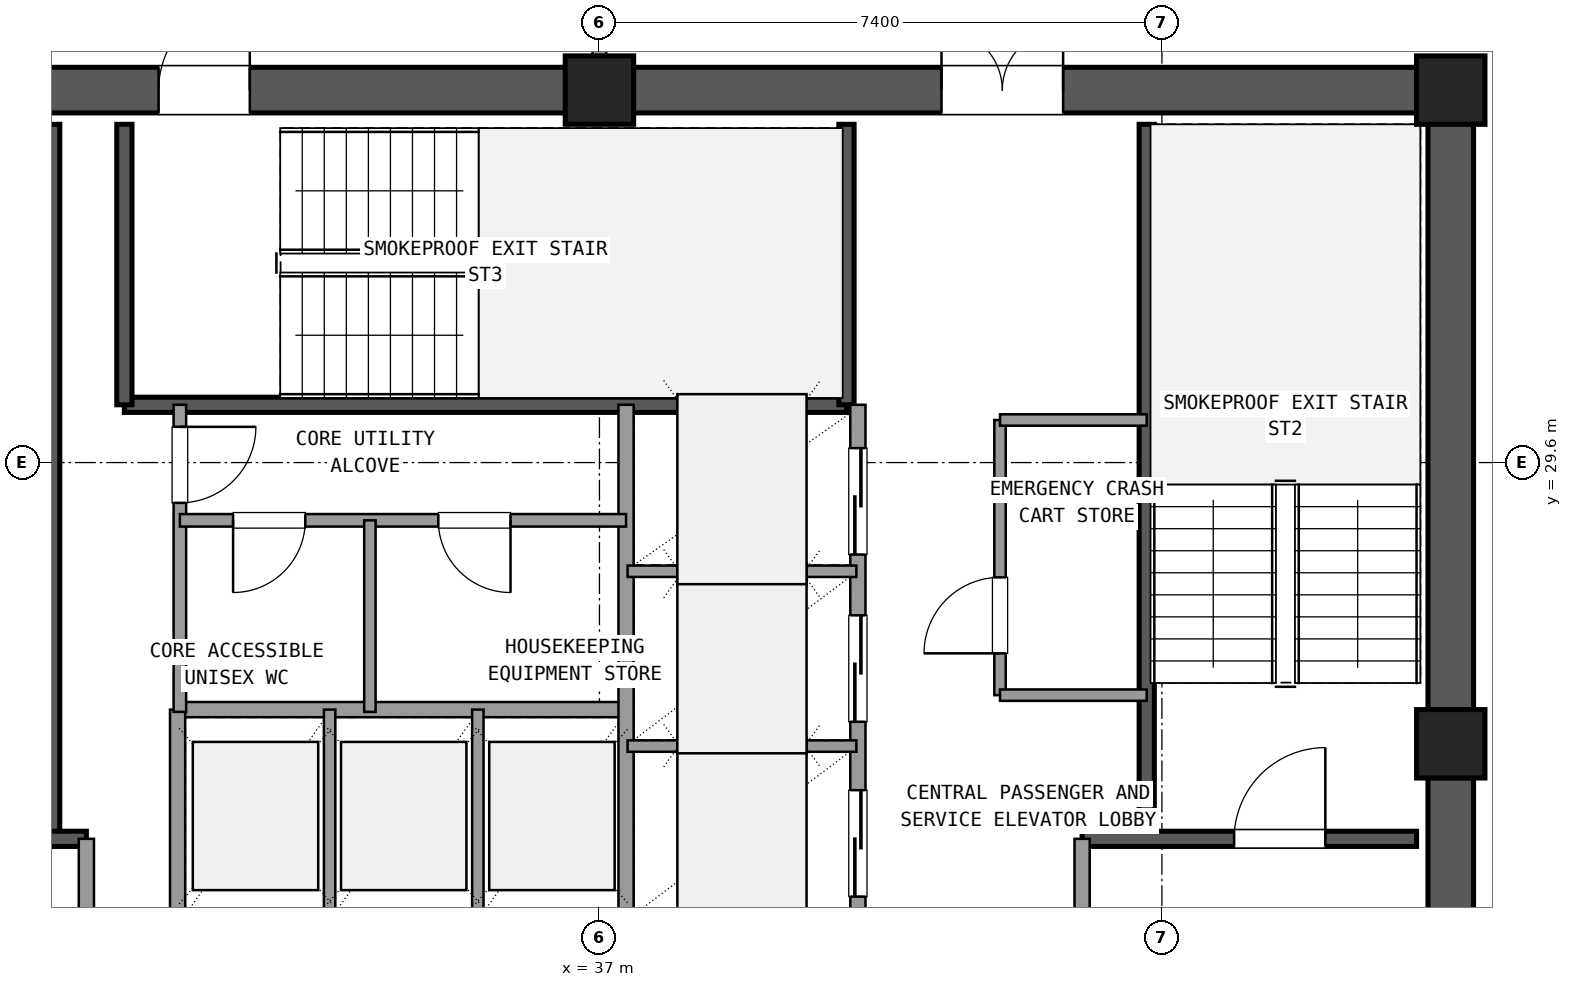
"""IFC4 building model, lengths in metres.
Left out: names, types, materials, properties, quantities, classifications, styles, units other than length and angle.
Written with IfcOpenShell. Run it as: python <this file> out.ifc"""

import sys

from ifc_helpers import new_model, si_unit, direction, frame, frame_2d, origin, origin_2d, place, context, subcontext, project, spatial, rectangle, extrude, element, fill, save


model = new_model("IFC4")
c1 = context("Model", 3, precision=1e-05, world=origin(), true_north=direction((0.0, 1.0)))
c2 = subcontext(c1, "Body", "Model", "MODEL_VIEW")
j1 = project(units=[si_unit("LENGTHUNIT", "METRE"), si_unit("PLANEANGLEUNIT", "RADIAN")], contexts=[c1])
p1 = place(None, origin())
s1 = spatial("IfcSite", under=j1, at=p1, CompositionType="ELEMENT")
p2 = place(p1, origin())
s2 = spatial("IfcBuilding", under=s1, at=p2, CompositionType="ELEMENT")
p3 = place(p2, frame((0.0, 0.0, 192.78)))
s3 = spatial("IfcBuildingStorey", under=s2, at=p3, CompositionType="ELEMENT", Elevation=192.78)
for number, where, z_axis, x_axis in (
    (1, (48.2, 25.9, 0.0), (0.0, 0.0, 1.0), (1.0, 0.0, 0.0)),
    (2, (48.2, 34.5, 0.0), (0.0, 0.0, 1.0), (1.0, 0.0, 0.0)),
    (3, (37.0, 34.5, 0.0), (0.0, 0.0, 1.0), (1.0, 0.0, 0.0)),
):
    element("IfcColumn", number, at=place(p3, frame(where, z_axis=z_axis, x_axis=x_axis)), inside=s3, PredefinedType="COLUMN", context=c2, shape_type="SweptSolid", body=[
        extrude(rectangle(XDim=0.9, YDim=0.9, at=origin_2d()), origin(), (0.0, 0.0, 1.0), 3.6),
    ])
p4 = place(p3, frame((48.2, 17.745, 0.0), z_axis=(0.0, 0.0, 1.0), x_axis=(0.0, 1.0, 0.0)))
e4 = element("IfcWall", 4, at=p4, inside=s3, PredefinedType="SHEAR", context=c2, shape_type="SweptSolid", body=[
    extrude(rectangle(XDim=7.71, YDim=0.6, at=frame_2d((3.855, 0.0))), origin(), (0.0, 0.0, 1.0), 3.32),
])
p5 = place(p4, frame((4.305, 0.0, 0.0)))
e5 = element("IfcOpeningElement", 5, at=p5, cuts=e4, PredefinedType="OPENING", context=c2, shape_type="SweptSolid", body=[
    extrude(rectangle(XDim=1.2, YDim=2.15, at=frame_2d((0.6, 1.075))), frame((0.0, 0.31, 0.0), z_axis=(0.0, -1.0, 0.0), x_axis=(1.0, 0.0, 0.0)), (0.0, 0.0, 1.0), 0.62),
])
p6 = place(p3, frame((48.2, 26.345, 0.0), z_axis=(0.0, 0.0, 1.0), x_axis=(0.0, 1.0, 0.0)))
e6 = element("IfcWall", 6, at=p6, inside=s3, PredefinedType="SHEAR", context=c2, shape_type="SweptSolid", body=[
    extrude(rectangle(XDim=7.71, YDim=0.6, at=frame_2d((3.855, 0.0))), origin(), (0.0, 0.0, 1.0), 3.32),
])
p7 = place(p3, frame((47.755, 34.5, 0.0), z_axis=(0.0, 0.0, 1.0), x_axis=(-1.0, 0.0, 0.0)))
e7 = element("IfcWall", 7, at=p7, inside=s3, PredefinedType="SHEAR", context=c2, shape_type="SweptSolid", body=[
    extrude(rectangle(XDim=10.31, YDim=0.6, at=frame_2d((5.155, 0.0))), origin(), (0.0, 0.0, 1.0), 3.32),
])
p8 = place(p7, frame((4.655, 0.0, 0.0)))
e8 = element("IfcOpeningElement", 8, at=p8, cuts=e7, PredefinedType="OPENING", context=c2, shape_type="SweptSolid", body=[
    extrude(rectangle(XDim=1.6, YDim=2.2, at=frame_2d((0.8, 1.1))), frame((0.0, 0.31, 0.0), z_axis=(0.0, -1.0, 0.0), x_axis=(1.0, 0.0, 0.0)), (0.0, 0.0, 1.0), 0.62),
])
p9 = place(p3, frame((36.555, 34.5, 0.0), z_axis=(0.0, 0.0, 1.0), x_axis=(-1.0, 0.0, 0.0)))
e9 = element("IfcWall", 9, at=p9, inside=s3, PredefinedType="SHEAR", context=c2, shape_type="SweptSolid", body=[
    extrude(rectangle(XDim=10.31, YDim=0.6, at=frame_2d((5.155, 0.0))), origin(), (0.0, 0.0, 1.0), 3.32),
])
p10 = place(p9, frame((4.155, 0.0, 0.0)))
e10 = element("IfcOpeningElement", 10, at=p10, cuts=e9, PredefinedType="OPENING", context=c2, shape_type="SweptSolid", body=[
    extrude(rectangle(XDim=1.2, YDim=2.15, at=frame_2d((0.6, 1.075))), frame((0.0, 0.31, 0.0), z_axis=(0.0, -1.0, 0.0), x_axis=(1.0, 0.0, 0.0)), (0.0, 0.0, 1.0), 0.62),
])
p11 = place(p3, frame((29.8, 24.65, 0.0), z_axis=(0.0, 0.0, 1.0), x_axis=(0.0, 1.0, 0.0)))
e11 = element("IfcWall", 11, at=p11, inside=s3, PredefinedType="SHEAR", context=c2, shape_type="SweptSolid", body=[
    extrude(rectangle(XDim=9.4, YDim=0.2, at=frame_2d((4.7, 0.0))), origin(), (0.0, 0.0, 1.0), 3.32),
])
p12 = place(p3, frame((26.25, 24.65, 0.0), z_axis=(0.0, 0.0, 1.0), x_axis=(1.0, 0.0, 0.0)))
e12 = element("IfcWall", 12, at=p12, inside=s3, PredefinedType="SHEAR", context=c2, shape_type="SweptSolid", body=[
    extrude(rectangle(XDim=4.0, YDim=0.2, at=frame_2d((2.0, 0.0))), origin(), (0.0, 0.0, 1.0), 3.32),
])
p13 = place(p12, frame((1.0, 0.0, 0.0)))
e13 = element("IfcOpeningElement", 13, at=p13, cuts=e12, PredefinedType="OPENING", context=c2, shape_type="SweptSolid", body=[
    extrude(rectangle(XDim=1.2, YDim=2.15, at=frame_2d((0.6, 1.075))), frame((0.0, 0.11, 0.0), z_axis=(0.0, -1.0, 0.0), x_axis=(1.0, 0.0, 0.0)), (0.0, 0.0, 1.0), 0.22),
])
p14 = place(p3, frame((44.2, 24.65, 0.0), z_axis=(0.0, 0.0, 1.0), x_axis=(0.0, 1.0, 0.0)))
e14 = element("IfcWall", 14, at=p14, inside=s3, PredefinedType="SHEAR", context=c2, shape_type="SweptSolid", body=[
    extrude(rectangle(XDim=9.4, YDim=0.2, at=frame_2d((4.7, 0.0))), origin(), (0.0, 0.0, 1.0), 3.32),
])
p15 = place(p3, frame((43.35, 24.65, 0.0), z_axis=(0.0, 0.0, 1.0), x_axis=(1.0, 0.0, 0.0)))
e15 = element("IfcWall", 15, at=p15, inside=s3, PredefinedType="SHEAR", context=c2, shape_type="SweptSolid", body=[
    extrude(rectangle(XDim=4.4, YDim=0.2, at=frame_2d((2.2, 0.0))), origin(), (0.0, 0.0, 1.0), 3.32),
])
p16 = place(p15, frame((2.0, 0.0, 0.0)))
e16 = element("IfcOpeningElement", 16, at=p16, cuts=e15, PredefinedType="OPENING", context=c2, shape_type="SweptSolid", body=[
    extrude(rectangle(XDim=1.2, YDim=2.15, at=frame_2d((0.6, 1.075))), frame((0.0, 0.11, 0.0), z_axis=(0.0, -1.0, 0.0), x_axis=(1.0, 0.0, 0.0)), (0.0, 0.0, 1.0), 0.22),
])
p17 = place(p3, frame((30.75, 30.36, 0.0), z_axis=(0.0, 0.0, 1.0), x_axis=(1.0, 0.0, 0.0)))
e17 = element("IfcWall", 17, at=p17, inside=s3, PredefinedType="SHEAR", context=c2, shape_type="SweptSolid", body=[
    extrude(rectangle(XDim=9.5, YDim=0.2, at=frame_2d((4.75, 0.0))), origin(), (0.0, 0.0, 1.0), 3.32),
])
for number, where, z_axis, x_axis in (
    (18, (30.75, 30.36, 0.0), (0.0, 0.0, 1.0), (0.0, 1.0, 0.0)),
    (19, (40.25, 30.36, 0.0), (0.0, 0.0, 1.0), (0.0, 1.0, 0.0)),
):
    element("IfcWall", number, at=place(p3, frame(where, z_axis=z_axis, x_axis=x_axis)), inside=s3, PredefinedType="SHEAR", context=c2, shape_type="SweptSolid", body=[
        extrude(rectangle(XDim=3.69, YDim=0.2, at=frame_2d((1.845, 0.0))), origin(), (0.0, 0.0, 1.0), 3.32),
    ])
p18 = place(p3, frame((30.25, 17.75, 0.0), z_axis=(0.0, 0.0, 1.0), x_axis=(0.0, 1.0, 0.0)))
e20 = element("IfcWall", 20, at=p18, inside=s3, PredefinedType="SOLIDWALL", context=c2, shape_type="SweptSolid", body=[
    extrude(rectangle(XDim=6.9, YDim=0.2, at=frame_2d((3.45, 0.0))), origin(), (0.0, 0.0, 1.0), 2.61),
])
p19 = place(p18, frame((4.15, 0.0, 0.0)))
e21 = element("IfcOpeningElement", 21, at=p19, cuts=e20, PredefinedType="OPENING", context=c2, shape_type="SweptSolid", body=[
    extrude(rectangle(XDim=1.2, YDim=2.15, at=frame_2d((0.6, 1.075))), frame((0.0, 0.11, 0.0), z_axis=(0.0, -1.0, 0.0), x_axis=(1.0, 0.0, 0.0)), (0.0, 0.0, 1.0), 0.22),
])
p20 = place(p3, frame((43.35, 17.75, 0.0), z_axis=(0.0, 0.0, 1.0), x_axis=(0.0, 1.0, 0.0)))
e22 = element("IfcWall", 22, at=p20, inside=s3, PredefinedType="SOLIDWALL", context=c2, shape_type="SweptSolid", body=[
    extrude(rectangle(XDim=6.9, YDim=0.2, at=frame_2d((3.45, 0.0))), origin(), (0.0, 0.0, 1.0), 2.61),
])
p21 = place(p20, frame((4.15, 0.0, 0.0)))
e23 = element("IfcOpeningElement", 23, at=p21, cuts=e22, PredefinedType="OPENING", context=c2, shape_type="SweptSolid", body=[
    extrude(rectangle(XDim=1.2, YDim=2.15, at=frame_2d((0.6, 1.075))), frame((0.0, 0.11, 0.0), z_axis=(0.0, -1.0, 0.0), x_axis=(1.0, 0.0, 0.0)), (0.0, 0.0, 1.0), 0.22),
])
p22 = place(p3, frame((31.45, 26.35, 0.0), z_axis=(0.0, 0.0, 1.0), x_axis=(1.0, 0.0, 0.0)))
e24 = element("IfcWall", 24, at=p22, inside=s3, PredefinedType="SOLIDWALL", context=c2, shape_type="SweptSolid", body=[
    extrude(rectangle(XDim=5.9, YDim=0.2, at=frame_2d((2.95, 0.0))), origin(), (0.0, 0.0, 1.0), 2.61),
])
p23 = place(p3, frame((31.45, 23.54, 0.0), z_axis=(0.0, 0.0, 1.0), x_axis=(0.0, 1.0, 0.0)))
e25 = element("IfcWall", 25, at=p23, inside=s3, PredefinedType="SOLIDWALL", context=c2, shape_type="SweptSolid", body=[
    extrude(rectangle(XDim=2.81, YDim=0.2, at=frame_2d((1.405, 0.0))), origin(), (0.0, 0.0, 1.0), 2.61),
])
for number, where, z_axis, x_axis in (
    (26, (33.45, 23.54, 0.0), (0.0, 0.0, 1.0), (0.0, 1.0, 0.0)),
    (27, (35.4, 23.54, 0.0), (0.0, 0.0, 1.0), (0.0, 1.0, 0.0)),
):
    element("IfcWall", number, at=place(p3, frame(where, z_axis=z_axis, x_axis=x_axis)), inside=s3, PredefinedType="PARTITIONING", context=c2, shape_type="SweptSolid", body=[
        extrude(rectangle(XDim=2.81, YDim=0.15, at=frame_2d((1.405, 0.0))), origin(), (0.0, 0.0, 1.0), 2.61),
    ])
p24 = place(p3, frame((37.35, 23.54, 0.0), z_axis=(0.0, 0.0, 1.0), x_axis=(0.0, 1.0, 0.0)))
e28 = element("IfcWall", 28, at=p24, inside=s3, PredefinedType="SOLIDWALL", context=c2, shape_type="SweptSolid", body=[
    extrude(rectangle(XDim=6.82, YDim=0.2, at=frame_2d((3.41, 0.0))), origin(), (0.0, 0.0, 1.0), 2.61),
])
p25 = place(p3, frame((40.4, 23.54, 0.0), z_axis=(0.0, 0.0, 1.0), x_axis=(0.0, 1.0, 0.0)))
e29 = element("IfcWall", 29, at=p25, inside=s3, PredefinedType="SOLIDWALL", context=c2, shape_type="SweptSolid", body=[
    extrude(rectangle(XDim=6.82, YDim=0.2, at=frame_2d((3.41, 0.0))), origin(), (0.0, 0.0, 1.0), 2.61),
])
p26 = place(p25, frame((0.35, 0.0, 0.0)))
e30 = element("IfcOpeningElement", 30, at=p26, cuts=e29, PredefinedType="OPENING", context=c2, shape_type="SweptSolid", body=[
    extrude(rectangle(XDim=1.4, YDim=2.2, at=frame_2d((0.7, 1.1))), frame((0.0, 0.11, 0.0), z_axis=(0.0, -1.0, 0.0), x_axis=(1.0, 0.0, 0.0)), (0.0, 0.0, 1.0), 0.22),
])
p27 = place(p25, frame((2.65, 0.0, 0.0)))
e31 = element("IfcOpeningElement", 31, at=p27, cuts=e29, PredefinedType="OPENING", context=c2, shape_type="SweptSolid", body=[
    extrude(rectangle(XDim=1.4, YDim=2.2, at=frame_2d((0.7, 1.1))), frame((0.0, 0.11, 0.0), z_axis=(0.0, -1.0, 0.0), x_axis=(1.0, 0.0, 0.0)), (0.0, 0.0, 1.0), 0.22),
])
p28 = place(p25, frame((4.85, 0.0, 0.0)))
e32 = element("IfcOpeningElement", 32, at=p28, cuts=e29, PredefinedType="OPENING", context=c2, shape_type="SweptSolid", body=[
    extrude(rectangle(XDim=1.4, YDim=2.2, at=frame_2d((0.7, 1.1))), frame((0.0, 0.11, 0.0), z_axis=(0.0, -1.0, 0.0), x_axis=(1.0, 0.0, 0.0)), (0.0, 0.0, 1.0), 0.22),
])
for number, where, z_axis, x_axis in (
    (33, (37.37, 25.87, 0.0), (0.0, 0.0, 1.0), (1.0, 0.0, 0.0)),
    (34, (37.37, 28.17, 0.0), (0.0, 0.0, 1.0), (1.0, 0.0, 0.0)),
):
    element("IfcWall", number, at=place(p3, frame(where, z_axis=z_axis, x_axis=x_axis)), inside=s3, PredefinedType="PARTITIONING", context=c2, shape_type="SweptSolid", body=[
        extrude(rectangle(XDim=3.01, YDim=0.15, at=frame_2d((1.505, 0.0))), origin(), (0.0, 0.0, 1.0), 2.61),
    ])
p29 = place(p3, frame((42.27, 26.54, 0.0), z_axis=(0.0, 0.0, 1.0), x_axis=(0.0, 1.0, 0.0)))
e35 = element("IfcWall", 35, at=p29, inside=s3, PredefinedType="PARTITIONING", context=c2, shape_type="SweptSolid", body=[
    extrude(rectangle(XDim=3.62, YDim=0.15, at=frame_2d((1.81, 0.0))), origin(), (0.0, 0.0, 1.0), 2.61),
])
p30 = place(p29, frame((0.55, 0.0, 0.0)))
e36 = element("IfcOpeningElement", 36, at=p30, cuts=e35, PredefinedType="OPENING", context=c2, shape_type="SweptSolid", body=[
    extrude(rectangle(XDim=1.0, YDim=2.15, at=frame_2d((0.5, 1.075))), frame((0.0, 0.085, 0.0), z_axis=(0.0, -1.0, 0.0), x_axis=(1.0, 0.0, 0.0)), (0.0, 0.0, 1.0), 0.17),
])
for number, where, z_axis, x_axis in (
    (37, (42.27, 26.54, 0.0), (0.0, 0.0, 1.0), (1.0, 0.0, 0.0)),
    (38, (42.27, 30.16, 0.0), (0.0, 0.0, 1.0), (1.0, 0.0, 0.0)),
):
    element("IfcWall", number, at=place(p3, frame(where, z_axis=z_axis, x_axis=x_axis)), inside=s3, PredefinedType="PARTITIONING", context=c2, shape_type="SweptSolid", body=[
        extrude(rectangle(XDim=1.93, YDim=0.15, at=frame_2d((0.965, 0.0))), origin(), (0.0, 0.0, 1.0), 2.61),
    ])
p31 = place(p3, frame((31.48, 26.32, 0.0), z_axis=(0.0, 0.0, 1.0), x_axis=(0.0, 1.0, 0.0)))
e39 = element("IfcWall", 39, at=p31, inside=s3, PredefinedType="PLUMBINGWALL", context=c2, shape_type="SweptSolid", body=[
    extrude(rectangle(XDim=4.04, YDim=0.165, at=frame_2d((2.02, 0.0))), origin(), (0.0, 0.0, 1.0), 2.61),
])
p32 = place(p31, frame((2.75, 0.0, 0.0)))
e40 = element("IfcOpeningElement", 40, at=p32, cuts=e39, PredefinedType="OPENING", context=c2, shape_type="SweptSolid", body=[
    extrude(rectangle(XDim=1.0, YDim=2.15, at=frame_2d((0.5, 1.075))), frame((0.0, 0.093, 0.0), z_axis=(0.0, -1.0, 0.0), x_axis=(1.0, 0.0, 0.0)), (0.0, 0.0, 1.0), 0.185),
])
p33 = place(p3, frame((31.48, 28.84, 0.0), z_axis=(0.0, 0.0, 1.0), x_axis=(1.0, 0.0, 0.0)))
e41 = element("IfcWall", 41, at=p33, inside=s3, PredefinedType="PLUMBINGWALL", context=c2, shape_type="SweptSolid", body=[
    extrude(rectangle(XDim=5.87, YDim=0.165, at=frame_2d((2.935, 0.0))), origin(), (0.0, 0.0, 1.0), 2.61),
])
p34 = place(p33, frame((0.7, 0.0, 0.0)))
e42 = element("IfcOpeningElement", 42, at=p34, cuts=e41, PredefinedType="OPENING", context=c2, shape_type="SweptSolid", body=[
    extrude(rectangle(XDim=0.95, YDim=2.1, at=frame_2d((0.475, 1.05))), frame((0.0, 0.093, 0.0), z_axis=(0.0, -1.0, 0.0), x_axis=(1.0, 0.0, 0.0)), (0.0, 0.0, 1.0), 0.185),
])
p35 = place(p33, frame((3.4, 0.0, 0.0)))
e43 = element("IfcOpeningElement", 43, at=p35, cuts=e41, PredefinedType="OPENING", context=c2, shape_type="SweptSolid", body=[
    extrude(rectangle(XDim=0.95, YDim=2.1, at=frame_2d((0.475, 1.05))), frame((0.0, 0.093, 0.0), z_axis=(0.0, -1.0, 0.0), x_axis=(1.0, 0.0, 0.0)), (0.0, 0.0, 1.0), 0.185),
])
p36 = place(p3, frame((33.98, 26.32, 0.0), z_axis=(0.0, 0.0, 1.0), x_axis=(0.0, 1.0, 0.0)))
e44 = element("IfcWall", 44, at=p36, inside=s3, PredefinedType="PARTITIONING", context=c2, shape_type="SweptSolid", body=[
    extrude(rectangle(XDim=2.52, YDim=0.15, at=frame_2d((1.26, 0.0))), origin(), (0.0, 0.0, 1.0), 2.61),
])
p37 = place(p3, frame((37.0, 34.95, 0.0), z_axis=(0.0, 0.0, 1.0), x_axis=(0.0, 1.0, 0.0)))
e45 = element("IfcWall", 45, at=p37, inside=s3, PredefinedType="PARTITIONING", context=c2, shape_type="SweptSolid", body=[
    extrude(rectangle(XDim=2.7, YDim=0.18, at=frame_2d((1.35, 0.0))), origin(), (0.0, 0.0, 1.0), 2.61),
])
p38 = place(p37, frame((0.35, 0.0, 0.0)))
e46 = element("IfcOpeningElement", 46, at=p38, cuts=e45, PredefinedType="OPENING", context=c2, shape_type="SweptSolid", body=[
    extrude(rectangle(XDim=2.0, YDim=2.2, at=frame_2d((1.0, 1.1))), frame((0.0, 0.1, 0.0), z_axis=(0.0, -1.0, 0.0), x_axis=(1.0, 0.0, 0.0)), (0.0, 0.0, 1.0), 0.2),
])
p39 = place(p16, origin())
e47 = element("IfcDoor", 47, at=p39, inside=s3, OperationType="SINGLE_SWING_RIGHT", PredefinedType="DOOR", context=c2, shape_type="SweptSolid", body=[
    extrude(rectangle(XDim=1.2, YDim=2.15, at=frame_2d((0.6, 1.075))), frame((0.0, 0.025, 0.0), z_axis=(0.0, -1.0, 0.0), x_axis=(1.0, 0.0, 0.0)), (0.0, 0.0, 1.0), 0.05),
])
fill(e16, e47)
p40 = place(p8, frame((1.6, 0.0, 0.0), z_axis=(0.0, 0.0, 1.0), x_axis=(-1.0, 0.0, 0.0)))
e48 = element("IfcDoor", 48, at=p40, inside=s3, OperationType="DOUBLE_DOOR_SINGLE_SWING", PredefinedType="DOOR", context=c2, shape_type="SweptSolid", body=[
    extrude(rectangle(XDim=1.6, YDim=2.2, at=frame_2d((0.8, 1.1))), frame((0.0, 0.025, 0.0), z_axis=(0.0, -1.0, 0.0), x_axis=(1.0, 0.0, 0.0)), (0.0, 0.0, 1.0), 0.05),
])
fill(e8, e48)
p41 = place(p10, frame((1.2, 0.0, 0.0), z_axis=(0.0, 0.0, 1.0), x_axis=(-1.0, 0.0, 0.0)))
e49 = element("IfcDoor", 49, at=p41, inside=s3, OperationType="SINGLE_SWING_LEFT", PredefinedType="DOOR", context=c2, shape_type="SweptSolid", body=[
    extrude(rectangle(XDim=1.2, YDim=2.15, at=frame_2d((0.6, 1.075))), frame((0.0, 0.025, 0.0), z_axis=(0.0, -1.0, 0.0), x_axis=(1.0, 0.0, 0.0)), (0.0, 0.0, 1.0), 0.05),
])
fill(e10, e49)
p42 = place(p26, origin())
e50 = element("IfcDoor", 50, at=p42, inside=s3, OperationType="SLIDING_TO_LEFT", PredefinedType="DOOR", context=c2, shape_type="SweptSolid", body=[
    extrude(rectangle(XDim=1.4, YDim=2.2, at=frame_2d((0.7, 1.1))), frame((0.0, 0.025, 0.0), z_axis=(0.0, -1.0, 0.0), x_axis=(1.0, 0.0, 0.0)), (0.0, 0.0, 1.0), 0.05),
])
fill(e30, e50)
p43 = place(p27, origin())
e51 = element("IfcDoor", 51, at=p43, inside=s3, OperationType="SLIDING_TO_LEFT", PredefinedType="DOOR", context=c2, shape_type="SweptSolid", body=[
    extrude(rectangle(XDim=1.4, YDim=2.2, at=frame_2d((0.7, 1.1))), frame((0.0, 0.025, 0.0), z_axis=(0.0, -1.0, 0.0), x_axis=(1.0, 0.0, 0.0)), (0.0, 0.0, 1.0), 0.05),
])
fill(e31, e51)
p44 = place(p28, origin())
e52 = element("IfcDoor", 52, at=p44, inside=s3, OperationType="SLIDING_TO_RIGHT", PredefinedType="DOOR", context=c2, shape_type="SweptSolid", body=[
    extrude(rectangle(XDim=1.4, YDim=2.2, at=frame_2d((0.7, 1.1))), frame((0.0, 0.025, 0.0), z_axis=(0.0, -1.0, 0.0), x_axis=(1.0, 0.0, 0.0)), (0.0, 0.0, 1.0), 0.05),
])
fill(e32, e52)
p45 = place(p30, origin())
e53 = element("IfcDoor", 53, at=p45, inside=s3, OperationType="SINGLE_SWING_LEFT", PredefinedType="DOOR", context=c2, shape_type="SweptSolid", body=[
    extrude(rectangle(XDim=1.0, YDim=2.15, at=frame_2d((0.5, 1.075))), frame((0.0, 0.025, 0.0), z_axis=(0.0, -1.0, 0.0), x_axis=(1.0, 0.0, 0.0)), (0.0, 0.0, 1.0), 0.05),
])
fill(e36, e53)
p46 = place(p32, frame((1.0, 0.0, 0.0), z_axis=(0.0, 0.0, 1.0), x_axis=(-1.0, 0.0, 0.0)))
e54 = element("IfcDoor", 54, at=p46, inside=s3, OperationType="SINGLE_SWING_RIGHT", PredefinedType="DOOR", context=c2, shape_type="SweptSolid", body=[
    extrude(rectangle(XDim=1.0, YDim=2.15, at=frame_2d((0.5, 1.075))), frame((0.0, 0.025, 0.0), z_axis=(0.0, -1.0, 0.0), x_axis=(1.0, 0.0, 0.0)), (0.0, 0.0, 1.0), 0.05),
])
fill(e40, e54)
p47 = place(p34, frame((0.95, 0.0, 0.0), z_axis=(0.0, 0.0, 1.0), x_axis=(-1.0, 0.0, 0.0)))
e55 = element("IfcDoor", 55, at=p47, inside=s3, OperationType="SINGLE_SWING_LEFT", PredefinedType="DOOR", context=c2, shape_type="SweptSolid", body=[
    extrude(rectangle(XDim=0.95, YDim=2.1, at=frame_2d((0.475, 1.05))), frame((0.0, 0.025, 0.0), z_axis=(0.0, -1.0, 0.0), x_axis=(1.0, 0.0, 0.0)), (0.0, 0.0, 1.0), 0.05),
])
fill(e42, e55)
p48 = place(p35, frame((0.95, 0.0, 0.0), z_axis=(0.0, 0.0, 1.0), x_axis=(-1.0, 0.0, 0.0)))
e56 = element("IfcDoor", 56, at=p48, inside=s3, OperationType="SINGLE_SWING_RIGHT", PredefinedType="DOOR", context=c2, shape_type="SweptSolid", body=[
    extrude(rectangle(XDim=0.95, YDim=2.1, at=frame_2d((0.475, 1.05))), frame((0.0, 0.025, 0.0), z_axis=(0.0, -1.0, 0.0), x_axis=(1.0, 0.0, 0.0)), (0.0, 0.0, 1.0), 0.05),
])
fill(e43, e56)
save(model, sys.argv[1])
